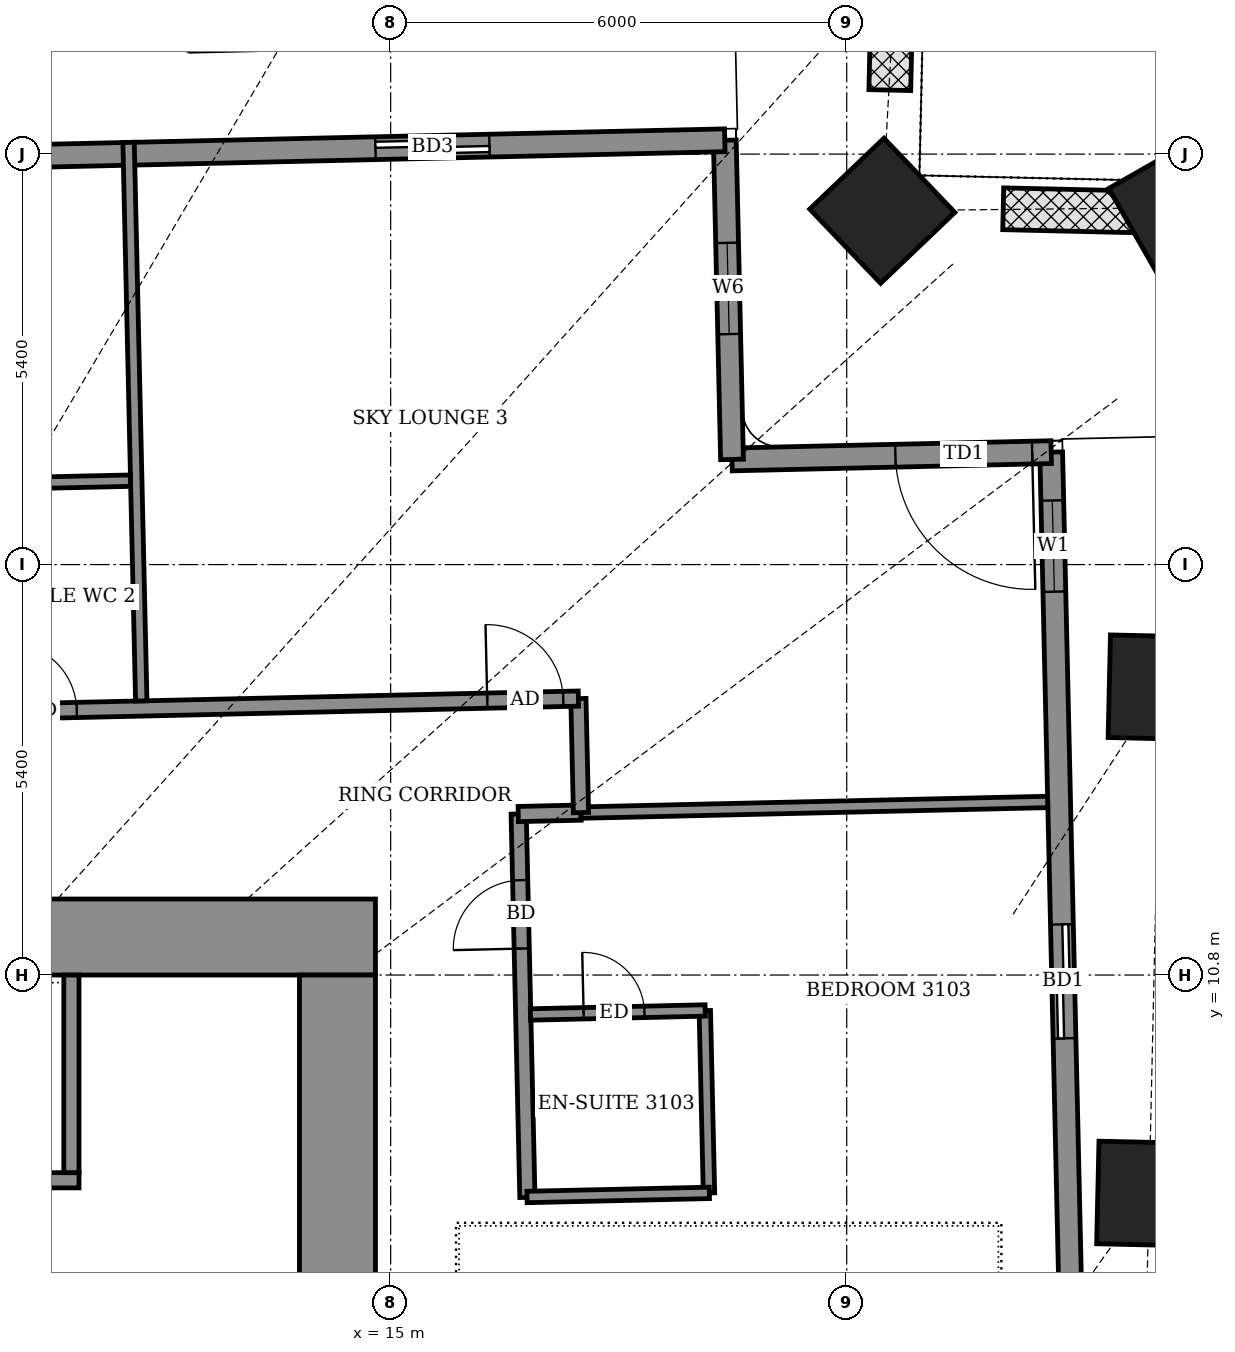
"""IFC4 building model, lengths in metres.
Left out: names, types, materials, properties, quantities, classifications, styles, units other than length and angle.
Written with IfcOpenShell. Run it as: python <this file> out.ifc"""

import sys

from ifc_helpers import new_model, si_unit, direction, frame, frame_2d, origin, origin_2d, place, context, subcontext, project, spatial, rectangle, extrude, element, fill, save


model = new_model("IFC4")
c1 = context("Model", 3, precision=1e-05, world=origin(), true_north=direction((0.0, 1.0)))
c2 = subcontext(c1, "Body", "Model", "MODEL_VIEW")
j1 = project(units=[si_unit("LENGTHUNIT", "METRE"), si_unit("PLANEANGLEUNIT", "RADIAN")], contexts=[c1])
p1 = place(None, origin())
s1 = spatial("IfcSite", under=j1, at=p1, CompositionType="ELEMENT")
p2 = place(p1, origin())
s2 = spatial("IfcBuilding", under=s1, at=p2, CompositionType="ELEMENT")
p3 = place(p2, frame((0.0, 0.0, 125.5)))
s3 = spatial("IfcBuildingStorey", under=s2, at=p3, CompositionType="ELEMENT", Elevation=125.5)
for number, where, z_axis, x_axis in (
    (1, (24.978, 7.924, -0.55), (0.0, 0.0, 1.0), (0.023, 1.0, 0.0)),
    (2, (25.129, 14.584, -0.55), (0.0, 0.0, 1.0), (0.023, 1.0, 0.0)),
    (3, (25.369, 20.896, -0.55), (0.0, 0.0, 1.0), (-0.495, 0.869, 0.0)),
    (4, (21.468, 20.855, -0.55), (0.0, 0.0, 1.0), (-0.691, 0.723, 0.0)),
):
    element("IfcColumn", number, at=place(p3, frame(where, z_axis=z_axis, x_axis=x_axis)), inside=s3, PredefinedType="COLUMN", context=c2, shape_type="SweptSolid", body=[
        extrude(rectangle(XDim=1.35, YDim=1.35, at=origin_2d()), origin(), (0.0, 0.0, 1.0), 4.6),
    ])
p4 = place(p3, frame((23.961, 5.752, 0.0), z_axis=(0.0, 0.0, 1.0), x_axis=(-0.022715362207, 0.999741972871, 0.0)))
e5 = element("IfcWall", 5, at=p4, inside=s3, PredefinedType="SOLIDWALL", context=c2, shape_type="SweptSolid", body=[
    extrude(rectangle(XDim=11.93, YDim=0.3, at=frame_2d((5.965, 0.0))), origin(), (0.0, 0.0, 1.0), 2.75),
])
p5 = place(p4, frame((4.216, 0.0, 0.0)))
e6 = element("IfcOpeningElement", 6, at=p5, cuts=e5, PredefinedType="OPENING", context=c2, shape_type="SweptSolid", body=[
    extrude(rectangle(XDim=1.5, YDim=2.4, at=frame_2d((0.75, 1.2))), frame((0.0, 0.16, 0.0), z_axis=(0.0, -1.0, 0.0), x_axis=(1.0, 0.0, 0.0)), (0.0, 0.0, 1.0), 0.32),
])
p6 = place(p4, frame((10.094, 0.0, 0.9)))
e7 = element("IfcOpeningElement", 7, at=p6, cuts=e5, PredefinedType="OPENING", context=c2, shape_type="SweptSolid", body=[
    extrude(rectangle(XDim=1.2, YDim=1.5, at=frame_2d((0.6, 0.75))), frame((0.0, 0.16, 0.0), z_axis=(0.0, -1.0, 0.0), x_axis=(1.0, 0.0, 0.0)), (0.0, 0.0, 1.0), 0.32),
])
p7 = place(p3, frame((23.69, 17.679, 0.0), z_axis=(0.0, 0.0, 1.0), x_axis=(-0.999739037152, -0.022844202663, 0.0)))
e8 = element("IfcWall", 8, at=p7, inside=s3, PredefinedType="SOLIDWALL", context=c2, shape_type="SweptSolid", body=[
    extrude(rectangle(XDim=4.2, YDim=0.3, at=frame_2d((2.1, 0.0))), origin(), (0.0, 0.0, 1.0), 2.75),
])
p8 = place(p7, frame((0.25, 0.0, 0.0)))
e9 = element("IfcOpeningElement", 9, at=p8, cuts=e8, PredefinedType="OPENING", context=c2, shape_type="SweptSolid", body=[
    extrude(rectangle(XDim=1.8, YDim=2.4, at=frame_2d((0.9, 1.2))), frame((0.0, 0.16, 0.0), z_axis=(0.0, -1.0, 0.0), x_axis=(1.0, 0.0, 0.0)), (0.0, 0.0, 1.0), 0.32),
])
p9 = place(p3, frame((19.491, 17.583, 0.0), z_axis=(0.0, 0.0, 1.0), x_axis=(-0.022611811187, 0.999744320311, 0.0)))
e10 = element("IfcWall", 10, at=p9, inside=s3, PredefinedType="SOLIDWALL", context=c2, shape_type="SweptSolid", body=[
    extrude(rectangle(XDim=4.2, YDim=0.3, at=frame_2d((2.1, 0.0))), origin(), (0.0, 0.0, 1.0), 2.35),
])
p10 = place(p9, frame((1.65, 0.0, 0.5)))
e11 = element("IfcOpeningElement", 11, at=p10, cuts=e10, PredefinedType="OPENING", context=c2, shape_type="SweptSolid", body=[
    extrude(rectangle(XDim=1.2, YDim=1.1, at=frame_2d((0.6, 0.55))), frame((0.0, 0.16, 0.0), z_axis=(0.0, -1.0, 0.0), x_axis=(1.0, 0.0, 0.0)), (0.0, 0.0, 1.0), 0.32),
])
p11 = place(p3, frame((19.396, 21.782, 0.0), z_axis=(0.0, 0.0, 1.0), x_axis=(-0.999742636707, -0.022686126826, 0.0)))
e12 = element("IfcWall", 12, at=p11, inside=s3, PredefinedType="SOLIDWALL", context=c2, shape_type="SweptSolid", body=[
    extrude(rectangle(XDim=42.444, YDim=0.3, at=frame_2d((21.222, 0.0))), origin(), (0.0, 0.0, 1.0), 2.35),
])
p12 = place(p11, frame((3.097, 0.0, 0.0)))
e13 = element("IfcOpeningElement", 13, at=p12, cuts=e12, PredefinedType="OPENING", context=c2, shape_type="SweptSolid", body=[
    extrude(rectangle(XDim=1.5, YDim=2.0, at=frame_2d((0.75, 1.0))), frame((0.0, 0.16, 0.0), z_axis=(0.0, -1.0, 0.0), x_axis=(1.0, 0.0, 0.0)), (0.0, 0.0, 1.0), 0.32),
])
p13 = place(p11, frame((11.269, 0.0, 0.5)))
e14 = element("IfcOpeningElement", 14, at=p13, cuts=e12, PredefinedType="OPENING", context=c2, shape_type="SweptSolid", body=[
    extrude(rectangle(XDim=1.2, YDim=1.1, at=frame_2d((0.6, 0.55))), frame((0.0, 0.16, 0.0), z_axis=(0.0, -1.0, 0.0), x_axis=(1.0, 0.0, 0.0)), (0.0, 0.0, 1.0), 0.32),
])
p14 = place(p11, frame((17.594, 0.0, 0.0)))
e15 = element("IfcOpeningElement", 15, at=p14, cuts=e12, PredefinedType="OPENING", context=c2, shape_type="SweptSolid", body=[
    extrude(rectangle(XDim=1.5, YDim=2.0, at=frame_2d((0.75, 1.0))), frame((0.0, 0.16, 0.0), z_axis=(0.0, -1.0, 0.0), x_axis=(1.0, 0.0, 0.0)), (0.0, 0.0, 1.0), 0.32),
])
p15 = place(p11, frame((22.919, 0.0, 0.0)))
e16 = element("IfcOpeningElement", 16, at=p15, cuts=e12, PredefinedType="OPENING", context=c2, shape_type="SweptSolid", body=[
    extrude(rectangle(XDim=1.5, YDim=2.0, at=frame_2d((0.75, 1.0))), frame((0.0, 0.16, 0.0), z_axis=(0.0, -1.0, 0.0), x_axis=(1.0, 0.0, 0.0)), (0.0, 0.0, 1.0), 0.32),
])
p16 = place(p11, frame((29.969, 0.0, 0.5)))
e17 = element("IfcOpeningElement", 17, at=p16, cuts=e12, PredefinedType="OPENING", context=c2, shape_type="SweptSolid", body=[
    extrude(rectangle(XDim=1.2, YDim=1.1, at=frame_2d((0.6, 0.55))), frame((0.0, 0.16, 0.0), z_axis=(0.0, -1.0, 0.0), x_axis=(1.0, 0.0, 0.0)), (0.0, 0.0, 1.0), 0.32),
])
p17 = place(p11, frame((37.612, 0.0, 0.5)))
e18 = element("IfcOpeningElement", 18, at=p17, cuts=e12, PredefinedType="OPENING", context=c2, shape_type="SweptSolid", body=[
    extrude(rectangle(XDim=1.2, YDim=1.1, at=frame_2d((0.6, 0.55))), frame((0.0, 0.16, 0.0), z_axis=(0.0, -1.0, 0.0), x_axis=(1.0, 0.0, 0.0)), (0.0, 0.0, 1.0), 0.32),
])
p18 = place(p3, frame((21.613, 24.479, 0.0), z_axis=(0.0, 0.0, 1.0), x_axis=(-0.022645198192, -0.99974356462, 0.0)))
e19 = element("IfcWall", 19, at=p18, inside=s3, PredefinedType="USERDEFINED", context=c2, shape_type="SweptSolid", body=[
    extrude(rectangle(XDim=2.038, YDim=0.55, at=frame_2d((1.019, 0.0))), origin(), (0.0, 0.0, 1.0), 0.8),
])
p19 = place(p3, frame((23.059, 20.881, 0.0), z_axis=(0.0, 0.0, 1.0), x_axis=(0.99973253567, -0.023126978231, 0.0)))
e20 = element("IfcWall", 20, at=p19, inside=s3, PredefinedType="USERDEFINED", context=c2, shape_type="SweptSolid", body=[
    extrude(rectangle(XDim=2.037, YDim=0.55, at=frame_2d((1.019, 0.0))), origin(), (0.0, 0.0, 1.0), 0.8),
])
p20 = place(p3, frame((16.799, 7.875, 0.0), z_axis=(0.0, 0.0, 1.0), x_axis=(-0.022791754614, 0.999740234222, 0.0)))
e21 = element("IfcWall", 21, at=p20, inside=s3, PredefinedType="PARTITIONING", context=c2, shape_type="SweptSolid", body=[
    extrude(rectangle(XDim=5.045, YDim=0.2, at=frame_2d((2.522, 0.0))), origin(), (0.0, 0.0, 1.0), 2.75),
])
p21 = place(p20, frame((3.274, 0.0, 0.0)))
e22 = element("IfcOpeningElement", 22, at=p21, cuts=e21, PredefinedType="OPENING", context=c2, shape_type="SweptSolid", body=[
    extrude(rectangle(XDim=0.9, YDim=2.1, at=frame_2d((0.45, 1.05))), frame((0.0, 0.11, 0.0), z_axis=(0.0, -1.0, 0.0), x_axis=(1.0, 0.0, 0.0)), (0.0, 0.0, 1.0), 0.22),
])
p22 = place(p3, frame((19.188, 7.933, 0.0), z_axis=(0.0, 0.0, 1.0), x_axis=(-0.022892431828, 0.999737933943, 0.0)))
e23 = element("IfcWall", 23, at=p22, inside=s3, PredefinedType="PARTITIONING", context=c2, shape_type="SweptSolid", body=[
    extrude(rectangle(XDim=2.4, YDim=0.15, at=frame_2d((1.2, 0.0))), origin(), (0.0, 0.0, 1.0), 4.05),
])
p23 = place(p3, frame((16.794, 7.88, 0.0), z_axis=(0.0, 0.0, 1.0), x_axis=(0.999744925027, 0.022585058854, 0.0)))
e24 = element("IfcWall", 24, at=p23, inside=s3, PredefinedType="PARTITIONING", context=c2, shape_type="SweptSolid", body=[
    extrude(rectangle(XDim=2.4, YDim=0.15, at=frame_2d((1.2, 0.0))), origin(), (0.0, 0.0, 1.0), 4.05),
])
p24 = place(p3, frame((16.839, 10.281, 0.0), z_axis=(0.0, 0.0, 1.0), x_axis=(0.999734549456, 0.023039761813, 0.0)))
e25 = element("IfcWall", 25, at=p24, inside=s3, PredefinedType="PARTITIONING", context=c2, shape_type="SweptSolid", body=[
    extrude(rectangle(XDim=2.3, YDim=0.15, at=frame_2d((1.15, 0.0))), origin(), (0.0, 0.0, 1.0), 4.05),
])
p25 = place(p24, frame((0.7, 0.0, 0.0)))
e26 = element("IfcOpeningElement", 26, at=p25, cuts=e25, PredefinedType="OPENING", context=c2, shape_type="SweptSolid", body=[
    extrude(rectangle(XDim=0.8, YDim=2.1, at=frame_2d((0.4, 1.05))), frame((0.0, 0.085, 0.0), z_axis=(0.0, -1.0, 0.0), x_axis=(1.0, 0.0, 0.0)), (0.0, 0.0, 1.0), 0.17),
])
p26 = place(p3, frame((16.679, 12.918, 0.0), z_axis=(0.0, 0.0, 1.0), x_axis=(0.999733676613, 0.023077604846, 0.0)))
e27 = element("IfcWall", 27, at=p26, inside=s3, PredefinedType="PARTITIONING", context=c2, shape_type="SweptSolid", body=[
    extrude(rectangle(XDim=0.825, YDim=0.2, at=frame_2d((0.413, 0.0))), origin(), (0.0, 0.0, 1.0), 2.75),
])
p27 = place(p3, frame((17.504, 12.937, 0.0), z_axis=(0.0, 0.0, 1.0), x_axis=(0.999740561613, 0.022777389336, 0.0)))
e28 = element("IfcWall", 28, at=p27, inside=s3, PredefinedType="PARTITIONING", context=c2, shape_type="SweptSolid", body=[
    extrude(rectangle(XDim=6.142, YDim=0.15, at=frame_2d((3.071, 0.0))), origin(), (0.0, 0.0, 1.0), 2.75),
])
p28 = place(p3, frame((17.504, 12.937, 0.0), z_axis=(0.0, 0.0, 1.0), x_axis=(-0.022617910375, 0.999744182344, 0.0)))
e29 = element("IfcWall", 29, at=p28, inside=s3, PredefinedType="PARTITIONING", context=c2, shape_type="SweptSolid", body=[
    extrude(rectangle(XDim=1.5, YDim=0.2, at=frame_2d((0.75, 0.0))), origin(), (0.0, 0.0, 1.0), 2.75),
])
p29 = place(p3, frame((-23.764, 13.501, 0.0), z_axis=(0.0, 0.0, 1.0), x_axis=(0.999742440266, 0.022694782029, 0.0)))
e30 = element("IfcWall", 30, at=p29, inside=s3, PredefinedType="PARTITIONING", context=c2, shape_type="SweptSolid", body=[
    extrude(rectangle(XDim=41.245, YDim=0.2, at=frame_2d((20.622, 0.0))), origin(), (0.0, 0.0, 1.0), 2.35),
])
p30 = place(p29, frame((40.045, 0.0, 0.0)))
e31 = element("IfcOpeningElement", 31, at=p30, cuts=e30, PredefinedType="OPENING", context=c2, shape_type="SweptSolid", body=[
    extrude(rectangle(XDim=1.0, YDim=2.1, at=frame_2d((0.5, 1.05))), frame((0.0, 0.11, 0.0), z_axis=(0.0, -1.0, 0.0), x_axis=(1.0, 0.0, 0.0)), (0.0, 0.0, 1.0), 0.22),
])
p31 = place(p29, frame((29.668, 0.0, 0.0)))
e32 = element("IfcOpeningElement", 32, at=p31, cuts=e30, PredefinedType="OPENING", context=c2, shape_type="SweptSolid", body=[
    extrude(rectangle(XDim=1.0, YDim=2.1, at=frame_2d((0.5, 1.05))), frame((0.0, 0.11, 0.0), z_axis=(0.0, -1.0, 0.0), x_axis=(1.0, 0.0, 0.0)), (0.0, 0.0, 1.0), 0.22),
])
p32 = place(p29, frame((33.743, 0.0, 0.0)))
e33 = element("IfcOpeningElement", 33, at=p32, cuts=e30, PredefinedType="OPENING", context=c2, shape_type="SweptSolid", body=[
    extrude(rectangle(XDim=0.9, YDim=2.1, at=frame_2d((0.45, 1.05))), frame((0.0, 0.11, 0.0), z_axis=(0.0, -1.0, 0.0), x_axis=(1.0, 0.0, 0.0)), (0.0, 0.0, 1.0), 0.22),
])
p33 = place(p29, frame((25.743, 0.0, 0.0)))
e34 = element("IfcOpeningElement", 34, at=p33, cuts=e30, PredefinedType="OPENING", context=c2, shape_type="SweptSolid", body=[
    extrude(rectangle(XDim=0.9, YDim=2.1, at=frame_2d((0.45, 1.05))), frame((0.0, 0.11, 0.0), z_axis=(0.0, -1.0, 0.0), x_axis=(1.0, 0.0, 0.0)), (0.0, 0.0, 1.0), 0.22),
])
p34 = place(p29, frame((19.168, 0.0, 0.0)))
e35 = element("IfcOpeningElement", 35, at=p34, cuts=e30, PredefinedType="OPENING", context=c2, shape_type="SweptSolid", body=[
    extrude(rectangle(XDim=1.0, YDim=2.1, at=frame_2d((0.5, 1.05))), frame((0.0, 0.11, 0.0), z_axis=(0.0, -1.0, 0.0), x_axis=(1.0, 0.0, 0.0)), (0.0, 0.0, 1.0), 0.22),
])
p35 = place(p29, frame((13.468, 0.0, 0.0)))
e36 = element("IfcOpeningElement", 36, at=p35, cuts=e30, PredefinedType="OPENING", context=c2, shape_type="SweptSolid", body=[
    extrude(rectangle(XDim=1.0, YDim=2.1, at=frame_2d((0.5, 1.05))), frame((0.0, 0.11, 0.0), z_axis=(0.0, -1.0, 0.0), x_axis=(1.0, 0.0, 0.0)), (0.0, 0.0, 1.0), 0.22),
])
p36 = place(p29, frame((9.493, 0.0, 0.0)))
e37 = element("IfcOpeningElement", 37, at=p36, cuts=e30, PredefinedType="OPENING", context=c2, shape_type="SweptSolid", body=[
    extrude(rectangle(XDim=0.9, YDim=2.1, at=frame_2d((0.45, 1.05))), frame((0.0, 0.11, 0.0), z_axis=(0.0, -1.0, 0.0), x_axis=(1.0, 0.0, 0.0)), (0.0, 0.0, 1.0), 0.22),
])
p37 = place(p29, frame((0.643, 0.0, 0.0)))
e38 = element("IfcOpeningElement", 38, at=p37, cuts=e30, PredefinedType="OPENING", context=c2, shape_type="SweptSolid", body=[
    extrude(rectangle(XDim=1.0, YDim=2.1, at=frame_2d((0.5, 1.05))), frame((0.0, 0.11, 0.0), z_axis=(0.0, -1.0, 0.0), x_axis=(1.0, 0.0, 0.0)), (0.0, 0.0, 1.0), 0.22),
])
p38 = place(p29, frame((7.093, 0.0, 0.0)))
e39 = element("IfcOpeningElement", 39, at=p38, cuts=e30, PredefinedType="OPENING", context=c2, shape_type="SweptSolid", body=[
    extrude(rectangle(XDim=0.9, YDim=2.1, at=frame_2d((0.45, 1.05))), frame((0.0, 0.11, 0.0), z_axis=(0.0, -1.0, 0.0), x_axis=(1.0, 0.0, 0.0)), (0.0, 0.0, 1.0), 0.22),
])
p39 = place(p3, frame((11.719, 14.406, 0.0), z_axis=(0.0, 0.0, 1.0), x_axis=(-0.022720650804, 0.999741852694, 0.0)))
e40 = element("IfcWall", 40, at=p39, inside=s3, PredefinedType="PARTITIONING", context=c2, shape_type="SweptSolid", body=[
    extrude(rectangle(XDim=7.35, YDim=0.15, at=frame_2d((3.675, 0.0))), origin(), (0.0, 0.0, 1.0), 2.55),
])
p40 = place(p3, frame((9.052, 17.247, 0.0), z_axis=(0.0, 0.0, 1.0), x_axis=(0.9997461113, 0.022532486354, 0.0)))
e41 = element("IfcWall", 41, at=p40, inside=s3, PredefinedType="PARTITIONING", context=c2, shape_type="SweptSolid", body=[
    extrude(rectangle(XDim=2.525, YDim=0.15, at=frame_2d((1.262, 0.0))), origin(), (0.0, 0.0, 1.0), 2.55),
])
p41 = place(p3, frame((-14.8, 11.3, 0.0), z_axis=(0.0, 0.0, 1.0), x_axis=(1.0, 0.0, 0.0)))
e42 = element("IfcWall", 42, at=p41, inside=s3, PredefinedType="SHEAR", context=c2, shape_type="SweptSolid", body=[
    extrude(rectangle(XDim=29.6, YDim=1.0, at=frame_2d((14.8, 0.0))), origin(), (0.0, 0.0, 1.0), 4.6),
])
p42 = place(p3, frame((14.3, -10.8, 0.0), z_axis=(0.0, 0.0, 1.0), x_axis=(0.0, 1.0, 0.0)))
e43 = element("IfcWall", 43, at=p42, inside=s3, PredefinedType="SHEAR", context=c2, shape_type="SweptSolid", body=[
    extrude(rectangle(XDim=21.6, YDim=1.0, at=frame_2d((10.8, 0.0))), origin(), (0.0, 0.0, 1.0), 4.6),
])
p43 = place(p42, frame((1.2, 0.0, 0.0)))
e44 = element("IfcOpeningElement", 44, at=p43, cuts=e43, PredefinedType="OPENING", context=c2, shape_type="SweptSolid", body=[
    extrude(rectangle(XDim=1.2, YDim=2.1, at=frame_2d((0.6, 1.05))), frame((0.0, 0.51, 0.0), z_axis=(0.0, -1.0, 0.0), x_axis=(1.0, 0.0, 0.0)), (0.0, 0.0, 1.0), 1.02),
])
p44 = place(p3, frame((-10.9, 8.1, 0.0), z_axis=(0.0, 0.0, 1.0), x_axis=(1.0, 0.0, 0.0)))
e45 = element("IfcWall", 45, at=p44, inside=s3, PredefinedType="SHEAR", context=c2, shape_type="SweptSolid", body=[
    extrude(rectangle(XDim=21.8, YDim=0.2, at=frame_2d((10.9, 0.0))), origin(), (0.0, 0.0, 1.0), 4.05),
])
p45 = place(p44, frame((14.4, 0.0, 0.0)))
e46 = element("IfcOpeningElement", 46, at=p45, cuts=e45, PredefinedType="OPENING", context=c2, shape_type="SweptSolid", body=[
    extrude(rectangle(XDim=1.1, YDim=2.1, at=frame_2d((0.55, 1.05))), frame((0.0, 0.11, 0.0), z_axis=(0.0, -1.0, 0.0), x_axis=(1.0, 0.0, 0.0)), (0.0, 0.0, 1.0), 0.22),
])
p46 = place(p44, frame((17.1, 0.0, 0.0)))
e47 = element("IfcOpeningElement", 47, at=p46, cuts=e45, PredefinedType="OPENING", context=c2, shape_type="SweptSolid", body=[
    extrude(rectangle(XDim=1.1, YDim=2.1, at=frame_2d((0.55, 1.05))), frame((0.0, 0.11, 0.0), z_axis=(0.0, -1.0, 0.0), x_axis=(1.0, 0.0, 0.0)), (0.0, 0.0, 1.0), 0.22),
])
p47 = place(p44, frame((19.8, 0.0, 0.0)))
e48 = element("IfcOpeningElement", 48, at=p47, cuts=e45, PredefinedType="OPENING", context=c2, shape_type="SweptSolid", body=[
    extrude(rectangle(XDim=1.1, YDim=2.1, at=frame_2d((0.55, 1.05))), frame((0.0, 0.11, 0.0), z_axis=(0.0, -1.0, 0.0), x_axis=(1.0, 0.0, 0.0)), (0.0, 0.0, 1.0), 0.22),
])
p48 = place(p44, frame((6.4, 0.0, 0.0)))
e49 = element("IfcOpeningElement", 49, at=p48, cuts=e45, PredefinedType="OPENING", context=c2, shape_type="SweptSolid", body=[
    extrude(rectangle(XDim=0.9, YDim=2.1, at=frame_2d((0.45, 1.05))), frame((0.0, 0.11, 0.0), z_axis=(0.0, -1.0, 0.0), x_axis=(1.0, 0.0, 0.0)), (0.0, 0.0, 1.0), 0.22),
])
p49 = place(p3, frame((10.8, 8.2, 0.0), z_axis=(0.0, 0.0, 1.0), x_axis=(0.0, 1.0, 0.0)))
e50 = element("IfcWall", 50, at=p49, inside=s3, PredefinedType="SHEAR", context=c2, shape_type="SweptSolid", body=[
    extrude(rectangle(XDim=2.6, YDim=0.2, at=frame_2d((1.3, 0.0))), origin(), (0.0, 0.0, 1.0), 4.05),
])
p50 = place(p5, origin())
e51 = element("IfcDoor", 51, at=p50, inside=s3, OperationType="SLIDING_TO_LEFT", PredefinedType="DOOR", context=c2, shape_type="SweptSolid", body=[
    extrude(rectangle(XDim=1.5, YDim=2.4, at=frame_2d((0.75, 1.2))), frame((0.0, 0.025, 0.0), z_axis=(0.0, -1.0, 0.0), x_axis=(1.0, 0.0, 0.0)), (0.0, 0.0, 1.0), 0.05),
])
fill(e6, e51)
p51 = place(p6, origin())
e52 = element("IfcWindow", 52, at=p51, inside=s3, PartitioningType="SINGLE_PANEL", PredefinedType="WINDOW", context=c2, shape_type="SweptSolid", body=[
    extrude(rectangle(XDim=1.2, YDim=1.5, at=frame_2d((0.6, 0.75))), frame((0.0, 0.03, 0.0), z_axis=(0.0, -1.0, 0.0), x_axis=(1.0, 0.0, 0.0)), (0.0, 0.0, 1.0), 0.06),
])
fill(e7, e52)
p52 = place(p8, origin())
e53 = element("IfcDoor", 53, at=p52, inside=s3, OperationType="DOUBLE_DOOR_SINGLE_SWING", PredefinedType="DOOR", context=c2, shape_type="SweptSolid", body=[
    extrude(rectangle(XDim=1.8, YDim=2.4, at=frame_2d((0.9, 1.2))), frame((0.0, 0.025, 0.0), z_axis=(0.0, -1.0, 0.0), x_axis=(1.0, 0.0, 0.0)), (0.0, 0.0, 1.0), 0.05),
])
fill(e9, e53)
p53 = place(p10, origin())
e54 = element("IfcWindow", 54, at=p53, inside=s3, PartitioningType="SINGLE_PANEL", PredefinedType="WINDOW", context=c2, shape_type="SweptSolid", body=[
    extrude(rectangle(XDim=1.2, YDim=1.1, at=frame_2d((0.6, 0.55))), frame((0.0, 0.03, 0.0), z_axis=(0.0, -1.0, 0.0), x_axis=(1.0, 0.0, 0.0)), (0.0, 0.0, 1.0), 0.06),
])
fill(e11, e54)
p54 = place(p12, origin())
e55 = element("IfcDoor", 55, at=p54, inside=s3, OperationType="SLIDING_TO_LEFT", PredefinedType="DOOR", context=c2, shape_type="SweptSolid", body=[
    extrude(rectangle(XDim=1.5, YDim=2.0, at=frame_2d((0.75, 1.0))), frame((0.0, 0.025, 0.0), z_axis=(0.0, -1.0, 0.0), x_axis=(1.0, 0.0, 0.0)), (0.0, 0.0, 1.0), 0.05),
])
fill(e13, e55)
p55 = place(p21, origin())
e56 = element("IfcDoor", 56, at=p55, inside=s3, OperationType="SINGLE_SWING_LEFT", PredefinedType="DOOR", context=c2, shape_type="SweptSolid", body=[
    extrude(rectangle(XDim=0.9, YDim=2.1, at=frame_2d((0.45, 1.05))), frame((0.0, 0.025, 0.0), z_axis=(0.0, -1.0, 0.0), x_axis=(1.0, 0.0, 0.0)), (0.0, 0.0, 1.0), 0.05),
])
fill(e22, e56)
p56 = place(p25, origin())
e57 = element("IfcDoor", 57, at=p56, inside=s3, OperationType="SINGLE_SWING_LEFT", PredefinedType="DOOR", context=c2, shape_type="SweptSolid", body=[
    extrude(rectangle(XDim=0.8, YDim=2.1, at=frame_2d((0.4, 1.05))), frame((0.0, 0.025, 0.0), z_axis=(0.0, -1.0, 0.0), x_axis=(1.0, 0.0, 0.0)), (0.0, 0.0, 1.0), 0.05),
])
fill(e26, e57)
p57 = place(p30, origin())
e58 = element("IfcDoor", 58, at=p57, inside=s3, OperationType="SINGLE_SWING_LEFT", PredefinedType="DOOR", context=c2, shape_type="SweptSolid", body=[
    extrude(rectangle(XDim=1.0, YDim=2.1, at=frame_2d((0.5, 1.05))), frame((0.0, 0.025, 0.0), z_axis=(0.0, -1.0, 0.0), x_axis=(1.0, 0.0, 0.0)), (0.0, 0.0, 1.0), 0.05),
])
fill(e31, e58)
p58 = place(p32, origin())
e59 = element("IfcDoor", 59, at=p58, inside=s3, OperationType="SINGLE_SWING_RIGHT", PredefinedType="DOOR", context=c2, shape_type="SweptSolid", body=[
    extrude(rectangle(XDim=0.9, YDim=2.1, at=frame_2d((0.45, 1.05))), frame((0.0, 0.025, 0.0), z_axis=(0.0, -1.0, 0.0), x_axis=(1.0, 0.0, 0.0)), (0.0, 0.0, 1.0), 0.05),
])
fill(e33, e59)
save(model, sys.argv[1])
